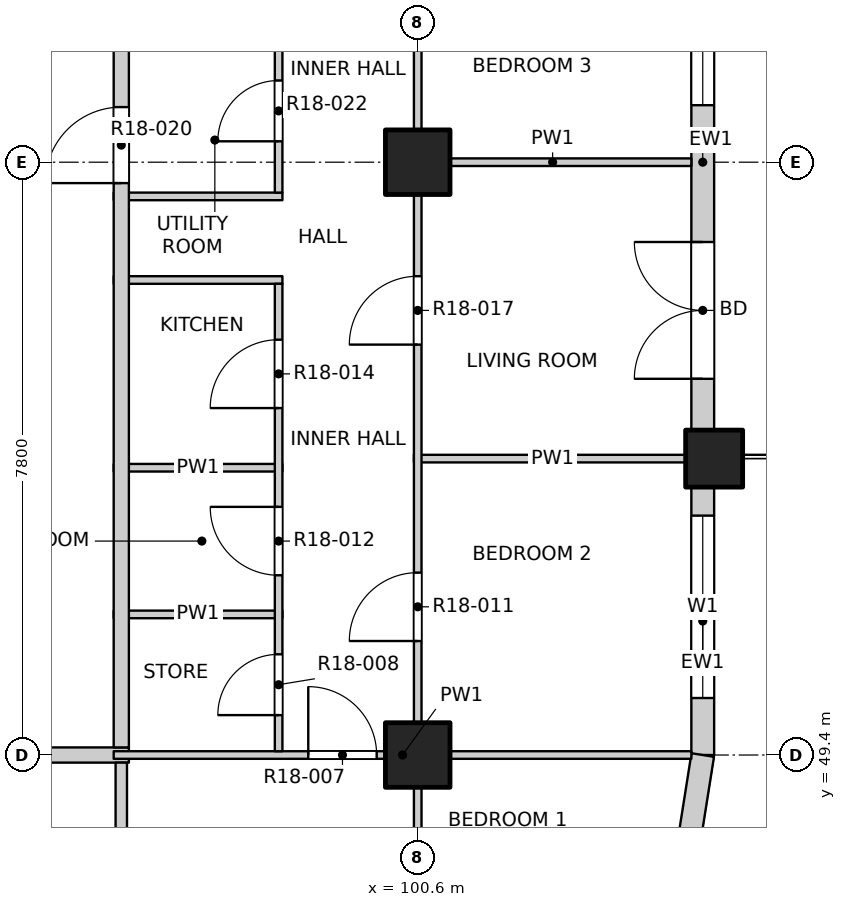
"""IFC4 building model, lengths in metres.
Left out: names, types, materials, properties, quantities, classifications, styles, units other than length and angle.
Written with IfcOpenShell. Run it as: python <this file> out.ifc"""

import sys

from ifc_helpers import new_model, si_unit, direction, frame, frame_2d, origin, origin_2d, place, context, subcontext, project, spatial, rectangle, extrude, element, fill, save


model = new_model("IFC4")
c1 = context("Model", 3, precision=1e-05, world=origin(), true_north=direction((0.0, 1.0)))
c2 = subcontext(c1, "Body", "Model", "MODEL_VIEW")
j1 = project(units=[si_unit("LENGTHUNIT", "METRE"), si_unit("PLANEANGLEUNIT", "RADIAN")], contexts=[c1])
p1 = place(None, origin())
s1 = spatial("IfcSite", under=j1, at=p1, CompositionType="ELEMENT")
p2 = place(p1, origin())
s2 = spatial("IfcBuilding", under=s1, at=p2, CompositionType="ELEMENT")
p3 = place(p2, frame((0.0, 0.0, 189.4)))
s3 = spatial("IfcBuildingStorey", under=s2, at=p3, CompositionType="ELEMENT", Elevation=189.4)
p4 = place(p3, frame((104.5, 53.3, -0.25), z_axis=(0.0, 0.0, 1.0), x_axis=(1.0, 0.0, 0.0)))
e1 = element("IfcColumn", 1, at=p4, inside=s3, PredefinedType="COLUMN", context=c2, shape_type="SweptSolid", body=[
    extrude(rectangle(XDim=0.75, YDim=0.75, at=origin_2d()), origin(), (0.0, 0.0, 1.0), 3.35),
])
for number, where, z_axis, x_axis in (
    (2, (100.6, 49.4, -0.25), (0.0, 0.0, 1.0), (1.0, 0.0, 0.0)),
    (3, (100.6, 57.2, -0.25), (0.0, 0.0, 1.0), (1.0, 0.0, 0.0)),
):
    element("IfcColumn", number, at=place(p3, frame(where, z_axis=z_axis, x_axis=x_axis)), inside=s3, PredefinedType="COLUMN", context=c2, shape_type="SweptSolid", body=[
        extrude(rectangle(XDim=0.85, YDim=0.85, at=origin_2d()), origin(), (0.0, 0.0, 1.0), 3.35),
    ])
p5 = place(p3, frame((104.35, 49.4, 0.0), z_axis=(0.0, 0.0, 1.0), x_axis=(0.0, 1.0, 0.0)))
e4 = element("IfcWall", 4, at=p5, inside=s3, PredefinedType="SOLIDWALL", context=c2, shape_type="SweptSolid", body=[
    extrude(rectangle(XDim=3.525, YDim=0.3, at=frame_2d((1.763, 0.0))), origin(), (0.0, 0.0, 1.0), 3.1),
])
p6 = place(p5, frame((0.75, 0.0, 0.9)))
e5 = element("IfcOpeningElement", 5, at=p6, cuts=e4, PredefinedType="OPENING", context=c2, shape_type="SweptSolid", body=[
    extrude(rectangle(XDim=2.4, YDim=1.8, at=frame_2d((1.2, 0.9))), frame((0.0, 0.16, 0.0), z_axis=(0.0, -1.0, 0.0), x_axis=(1.0, 0.0, 0.0)), (0.0, 0.0, 1.0), 0.32),
])
p7 = place(p3, frame((104.35, 53.675, 0.0), z_axis=(0.0, 0.0, 1.0), x_axis=(0.0, 1.0, 0.0)))
e6 = element("IfcWall", 6, at=p7, inside=s3, PredefinedType="SOLIDWALL", context=c2, shape_type="SweptSolid", body=[
    extrude(rectangle(XDim=7.05, YDim=0.3, at=frame_2d((3.525, 0.0))), origin(), (0.0, 0.0, 1.0), 3.1),
])
p8 = place(p7, frame((0.675, 0.0, 0.0)))
e7 = element("IfcOpeningElement", 7, at=p8, cuts=e6, PredefinedType="OPENING", context=c2, shape_type="SweptSolid", body=[
    extrude(rectangle(XDim=1.8, YDim=2.4, at=frame_2d((0.9, 1.2))), frame((0.0, 0.16, 0.0), z_axis=(0.0, -1.0, 0.0), x_axis=(1.0, 0.0, 0.0)), (0.0, 0.0, 1.0), 0.32),
])
p9 = place(p7, frame((4.275, 0.0, 0.9)))
e8 = element("IfcOpeningElement", 8, at=p9, cuts=e6, PredefinedType="OPENING", context=c2, shape_type="SweptSolid", body=[
    extrude(rectangle(XDim=2.4, YDim=1.8, at=frame_2d((1.2, 0.9))), frame((0.0, 0.16, 0.0), z_axis=(0.0, -1.0, 0.0), x_axis=(1.0, 0.0, 0.0)), (0.0, 0.0, 1.0), 0.32),
])
p10 = place(p3, frame((104.167, 48.241, 0.0), z_axis=(0.0, 0.0, 1.0), x_axis=(0.156496880861, 0.987678452879, 0.0)))
e9 = element("IfcWall", 9, at=p10, inside=s3, PredefinedType="SOLIDWALL", context=c2, shape_type="SweptSolid", body=[
    extrude(rectangle(XDim=1.173, YDim=0.3, at=frame_2d((0.586, 0.0))), origin(), (0.0, 0.0, 1.0), 3.1),
])
p11 = place(p3, frame((73.2, 49.4, 0.0), z_axis=(0.0, 0.0, 1.0), x_axis=(1.0, 0.0, 0.0)))
e10 = element("IfcWall", 10, at=p11, inside=s3, PredefinedType="PARTITIONING", context=c2, shape_type="SweptSolid", body=[
    extrude(rectangle(XDim=23.6, YDim=0.2, at=frame_2d((11.8, 0.0))), origin(), (0.0, 0.0, 1.0), 3.1),
])
p12 = place(p11, frame((4.525, 0.0, 0.0)))
e11 = element("IfcOpeningElement", 11, at=p12, cuts=e10, PredefinedType="OPENING", context=c2, shape_type="SweptSolid", body=[
    extrude(rectangle(XDim=1.2, YDim=2.1, at=frame_2d((0.6, 1.05))), frame((0.0, 0.11, 0.0), z_axis=(0.0, -1.0, 0.0), x_axis=(1.0, 0.0, 0.0)), (0.0, 0.0, 1.0), 0.22),
])
p13 = place(p11, frame((12.325, 0.0, 0.0)))
e12 = element("IfcOpeningElement", 12, at=p13, cuts=e10, PredefinedType="OPENING", context=c2, shape_type="SweptSolid", body=[
    extrude(rectangle(XDim=1.2, YDim=2.1, at=frame_2d((0.6, 1.05))), frame((0.0, 0.11, 0.0), z_axis=(0.0, -1.0, 0.0), x_axis=(1.0, 0.0, 0.0)), (0.0, 0.0, 1.0), 0.22),
])
p14 = place(p11, frame((20.125, 0.0, 0.0)))
e13 = element("IfcOpeningElement", 13, at=p14, cuts=e10, PredefinedType="OPENING", context=c2, shape_type="SweptSolid", body=[
    extrude(rectangle(XDim=1.2, YDim=2.1, at=frame_2d((0.6, 1.05))), frame((0.0, 0.11, 0.0), z_axis=(0.0, -1.0, 0.0), x_axis=(1.0, 0.0, 0.0)), (0.0, 0.0, 1.0), 0.22),
])
p15 = place(p3, frame((96.6, 49.4, 0.0), z_axis=(0.0, 0.0, 1.0), x_axis=(1.0, 0.0, 0.0)))
e14 = element("IfcWall", 14, at=p15, inside=s3, PredefinedType="PARTITIONING", context=c2, shape_type="SweptSolid", body=[
    extrude(rectangle(XDim=7.6, YDim=0.1, at=frame_2d((3.8, 0.0))), origin(), (0.0, 0.0, 1.0), 3.1),
])
p16 = place(p15, frame((2.56, 0.0, 0.0)))
e15 = element("IfcOpeningElement", 15, at=p16, cuts=e14, PredefinedType="OPENING", context=c2, shape_type="SweptSolid", body=[
    extrude(rectangle(XDim=0.9, YDim=2.1, at=frame_2d((0.45, 1.05))), frame((0.0, 0.06, 0.0), z_axis=(0.0, -1.0, 0.0), x_axis=(1.0, 0.0, 0.0)), (0.0, 0.0, 1.0), 0.12),
])
for number, where, z_axis, x_axis in (
    (16, (96.6, 51.25, 0.0), (0.0, 0.0, 1.0), (1.0, 0.0, 0.0)),
    (17, (96.6, 53.18, 0.0), (0.0, 0.0, 1.0), (1.0, 0.0, 0.0)),
):
    element("IfcWall", number, at=place(p3, frame(where, z_axis=z_axis, x_axis=x_axis)), inside=s3, PredefinedType="PARTITIONING", context=c2, shape_type="SweptSolid", body=[
        extrude(rectangle(XDim=2.22, YDim=0.1, at=frame_2d((1.11, 0.0))), origin(), (0.0, 0.0, 1.0), 3.1),
    ])
p17 = place(p3, frame((100.55, 53.3, 0.0), z_axis=(0.0, 0.0, 1.0), x_axis=(1.0, 0.0, 0.0)))
e18 = element("IfcWall", 18, at=p17, inside=s3, PredefinedType="PARTITIONING", context=c2, shape_type="SweptSolid", body=[
    extrude(rectangle(XDim=3.65, YDim=0.1, at=frame_2d((1.825, 0.0))), origin(), (0.0, 0.0, 1.0), 3.1),
])
for number, where, z_axis, x_axis in (
    (19, (96.6, 55.65, 0.0), (0.0, 0.0, 1.0), (1.0, 0.0, 0.0)),
    (20, (96.6, 56.75, 0.0), (0.0, 0.0, 1.0), (1.0, 0.0, 0.0)),
):
    element("IfcWall", number, at=place(p3, frame(where, z_axis=z_axis, x_axis=x_axis)), inside=s3, PredefinedType="PARTITIONING", context=c2, shape_type="SweptSolid", body=[
        extrude(rectangle(XDim=2.22, YDim=0.1, at=frame_2d((1.11, 0.0))), origin(), (0.0, 0.0, 1.0), 3.1),
    ])
p18 = place(p3, frame((100.55, 57.2, 0.0), z_axis=(0.0, 0.0, 1.0), x_axis=(1.0, 0.0, 0.0)))
e21 = element("IfcWall", 21, at=p18, inside=s3, PredefinedType="PARTITIONING", context=c2, shape_type="SweptSolid", body=[
    extrude(rectangle(XDim=3.65, YDim=0.1, at=frame_2d((1.825, 0.0))), origin(), (0.0, 0.0, 1.0), 3.1),
])
p19 = place(p3, frame((96.7, 45.8, 0.0), z_axis=(0.0, 0.0, 1.0), x_axis=(0.0, 1.0, 0.0)))
e22 = element("IfcWall", 22, at=p19, inside=s3, PredefinedType="PARTITIONING", context=c2, shape_type="SweptSolid", body=[
    extrude(rectangle(XDim=3.5, YDim=0.15, at=frame_2d((1.75, 0.0))), origin(), (0.0, 0.0, 1.0), 3.1),
])
p20 = place(p3, frame((96.7, 49.5, 0.0), z_axis=(0.0, 0.0, 1.0), x_axis=(0.0, 1.0, 0.0)))
e23 = element("IfcWall", 23, at=p20, inside=s3, PredefinedType="PARTITIONING", context=c2, shape_type="SweptSolid", body=[
    extrude(rectangle(XDim=34.7, YDim=0.2, at=frame_2d((17.35, 0.0))), origin(), (0.0, 0.0, 1.0), 3.1),
])
p21 = place(p20, frame((7.425, 0.0, 0.0)))
e24 = element("IfcOpeningElement", 24, at=p21, cuts=e23, PredefinedType="OPENING", context=c2, shape_type="SweptSolid", body=[
    extrude(rectangle(XDim=1.0, YDim=2.1, at=frame_2d((0.5, 1.05))), frame((0.0, 0.11, 0.0), z_axis=(0.0, -1.0, 0.0), x_axis=(1.0, 0.0, 0.0)), (0.0, 0.0, 1.0), 0.22),
])
p22 = place(p20, frame((18.475, 0.0, 0.0)))
e25 = element("IfcOpeningElement", 25, at=p22, cuts=e23, PredefinedType="OPENING", context=c2, shape_type="SweptSolid", body=[
    extrude(rectangle(XDim=1.0, YDim=2.1, at=frame_2d((0.5, 1.05))), frame((0.0, 0.11, 0.0), z_axis=(0.0, -1.0, 0.0), x_axis=(1.0, 0.0, 0.0)), (0.0, 0.0, 1.0), 0.22),
])
p23 = place(p20, frame((29.025, 0.0, 0.0)))
e26 = element("IfcOpeningElement", 26, at=p23, cuts=e23, PredefinedType="OPENING", context=c2, shape_type="SweptSolid", body=[
    extrude(rectangle(XDim=1.0, YDim=2.1, at=frame_2d((0.5, 1.05))), frame((0.0, 0.11, 0.0), z_axis=(0.0, -1.0, 0.0), x_axis=(1.0, 0.0, 0.0)), (0.0, 0.0, 1.0), 0.22),
])
p24 = place(p3, frame((98.77, 49.45, 0.0), z_axis=(0.0, 0.0, 1.0), x_axis=(0.0, 1.0, 0.0)))
e27 = element("IfcWall", 27, at=p24, inside=s3, PredefinedType="PARTITIONING", context=c2, shape_type="SweptSolid", body=[
    extrude(rectangle(XDim=6.15, YDim=0.1, at=frame_2d((3.075, 0.0))), origin(), (0.0, 0.0, 1.0), 3.1),
])
p25 = place(p24, frame((0.475, 0.0, 0.0)))
e28 = element("IfcOpeningElement", 28, at=p25, cuts=e27, PredefinedType="OPENING", context=c2, shape_type="SweptSolid", body=[
    extrude(rectangle(XDim=0.8, YDim=2.1, at=frame_2d((0.4, 1.05))), frame((0.0, 0.06, 0.0), z_axis=(0.0, -1.0, 0.0), x_axis=(1.0, 0.0, 0.0)), (0.0, 0.0, 1.0), 0.12),
])
p26 = place(p24, frame((2.315, 0.0, 0.0)))
e29 = element("IfcOpeningElement", 29, at=p26, cuts=e27, PredefinedType="OPENING", context=c2, shape_type="SweptSolid", body=[
    extrude(rectangle(XDim=0.9, YDim=2.1, at=frame_2d((0.45, 1.05))), frame((0.0, 0.06, 0.0), z_axis=(0.0, -1.0, 0.0), x_axis=(1.0, 0.0, 0.0)), (0.0, 0.0, 1.0), 0.12),
])
p27 = place(p24, frame((4.515, 0.0, 0.0)))
e30 = element("IfcOpeningElement", 30, at=p27, cuts=e27, PredefinedType="OPENING", context=c2, shape_type="SweptSolid", body=[
    extrude(rectangle(XDim=0.9, YDim=2.1, at=frame_2d((0.45, 1.05))), frame((0.0, 0.06, 0.0), z_axis=(0.0, -1.0, 0.0), x_axis=(1.0, 0.0, 0.0)), (0.0, 0.0, 1.0), 0.12),
])
p28 = place(p3, frame((98.77, 56.8, 0.0), z_axis=(0.0, 0.0, 1.0), x_axis=(0.0, 1.0, 0.0)))
e31 = element("IfcWall", 31, at=p28, inside=s3, PredefinedType="PARTITIONING", context=c2, shape_type="SweptSolid", body=[
    extrude(rectangle(XDim=9.85, YDim=0.1, at=frame_2d((4.925, 0.0))), origin(), (0.0, 0.0, 1.0), 3.1),
])
p29 = place(p28, frame((0.675, 0.0, 0.0)))
e32 = element("IfcOpeningElement", 32, at=p29, cuts=e31, PredefinedType="OPENING", context=c2, shape_type="SweptSolid", body=[
    extrude(rectangle(XDim=0.8, YDim=2.1, at=frame_2d((0.4, 1.05))), frame((0.0, 0.06, 0.0), z_axis=(0.0, -1.0, 0.0), x_axis=(1.0, 0.0, 0.0)), (0.0, 0.0, 1.0), 0.12),
])
p30 = place(p28, frame((2.8, 0.0, 0.0)))
e33 = element("IfcOpeningElement", 33, at=p30, cuts=e31, PredefinedType="OPENING", context=c2, shape_type="SweptSolid", body=[
    extrude(rectangle(XDim=0.9, YDim=2.1, at=frame_2d((0.45, 1.05))), frame((0.0, 0.06, 0.0), z_axis=(0.0, -1.0, 0.0), x_axis=(1.0, 0.0, 0.0)), (0.0, 0.0, 1.0), 0.12),
])
p31 = place(p28, frame((5.325, 0.0, 0.0)))
e34 = element("IfcOpeningElement", 34, at=p31, cuts=e31, PredefinedType="OPENING", context=c2, shape_type="SweptSolid", body=[
    extrude(rectangle(XDim=0.8, YDim=2.1, at=frame_2d((0.4, 1.05))), frame((0.0, 0.06, 0.0), z_axis=(0.0, -1.0, 0.0), x_axis=(1.0, 0.0, 0.0)), (0.0, 0.0, 1.0), 0.12),
])
p32 = place(p28, frame((8.125, 0.0, 0.0)))
e35 = element("IfcOpeningElement", 35, at=p32, cuts=e31, PredefinedType="OPENING", context=c2, shape_type="SweptSolid", body=[
    extrude(rectangle(XDim=0.8, YDim=2.1, at=frame_2d((0.4, 1.05))), frame((0.0, 0.06, 0.0), z_axis=(0.0, -1.0, 0.0), x_axis=(1.0, 0.0, 0.0)), (0.0, 0.0, 1.0), 0.12),
])
p33 = place(p3, frame((100.6, 45.8, 0.0), z_axis=(0.0, 0.0, 1.0), x_axis=(0.0, 1.0, 0.0)))
e36 = element("IfcWall", 36, at=p33, inside=s3, PredefinedType="PARTITIONING", context=c2, shape_type="SweptSolid", body=[
    extrude(rectangle(XDim=38.4, YDim=0.1, at=frame_2d((19.2, 0.0))), origin(), (0.0, 0.0, 1.0), 3.1),
])
p34 = place(p33, frame((1.05, 0.0, 0.0)))
e37 = element("IfcOpeningElement", 37, at=p34, cuts=e36, PredefinedType="OPENING", context=c2, shape_type="SweptSolid", body=[
    extrude(rectangle(XDim=1.2, YDim=2.1, at=frame_2d((0.6, 1.05))), frame((0.0, 0.06, 0.0), z_axis=(0.0, -1.0, 0.0), x_axis=(1.0, 0.0, 0.0)), (0.0, 0.0, 1.0), 0.12),
])
p35 = place(p33, frame((5.1, 0.0, 0.0)))
e38 = element("IfcOpeningElement", 38, at=p35, cuts=e36, PredefinedType="OPENING", context=c2, shape_type="SweptSolid", body=[
    extrude(rectangle(XDim=0.9, YDim=2.1, at=frame_2d((0.45, 1.05))), frame((0.0, 0.06, 0.0), z_axis=(0.0, -1.0, 0.0), x_axis=(1.0, 0.0, 0.0)), (0.0, 0.0, 1.0), 0.12),
])
p36 = place(p33, frame((9.0, 0.0, 0.0)))
e39 = element("IfcOpeningElement", 39, at=p36, cuts=e36, PredefinedType="OPENING", context=c2, shape_type="SweptSolid", body=[
    extrude(rectangle(XDim=0.9, YDim=2.1, at=frame_2d((0.45, 1.05))), frame((0.0, 0.06, 0.0), z_axis=(0.0, -1.0, 0.0), x_axis=(1.0, 0.0, 0.0)), (0.0, 0.0, 1.0), 0.12),
])
p37 = place(p33, frame((12.9, 0.0, 0.0)))
e40 = element("IfcOpeningElement", 40, at=p37, cuts=e36, PredefinedType="OPENING", context=c2, shape_type="SweptSolid", body=[
    extrude(rectangle(XDim=0.9, YDim=2.1, at=frame_2d((0.45, 1.05))), frame((0.0, 0.06, 0.0), z_axis=(0.0, -1.0, 0.0), x_axis=(1.0, 0.0, 0.0)), (0.0, 0.0, 1.0), 0.12),
])
p38 = place(p33, frame((19.725, 0.0, 0.0)))
e41 = element("IfcOpeningElement", 41, at=p38, cuts=e36, PredefinedType="OPENING", context=c2, shape_type="SweptSolid", body=[
    extrude(rectangle(XDim=1.2, YDim=2.1, at=frame_2d((0.6, 1.05))), frame((0.0, 0.06, 0.0), z_axis=(0.0, -1.0, 0.0), x_axis=(1.0, 0.0, 0.0)), (0.0, 0.0, 1.0), 0.12),
])
p39 = place(p33, frame((24.6, 0.0, 0.0)))
e42 = element("IfcOpeningElement", 42, at=p39, cuts=e36, PredefinedType="OPENING", context=c2, shape_type="SweptSolid", body=[
    extrude(rectangle(XDim=0.9, YDim=2.1, at=frame_2d((0.45, 1.05))), frame((0.0, 0.06, 0.0), z_axis=(0.0, -1.0, 0.0), x_axis=(1.0, 0.0, 0.0)), (0.0, 0.0, 1.0), 0.12),
])
p40 = place(p33, frame((28.5, 0.0, 0.0)))
e43 = element("IfcOpeningElement", 43, at=p40, cuts=e36, PredefinedType="OPENING", context=c2, shape_type="SweptSolid", body=[
    extrude(rectangle(XDim=0.9, YDim=2.1, at=frame_2d((0.45, 1.05))), frame((0.0, 0.06, 0.0), z_axis=(0.0, -1.0, 0.0), x_axis=(1.0, 0.0, 0.0)), (0.0, 0.0, 1.0), 0.12),
])
p41 = place(p33, frame((32.4, 0.0, 0.0)))
e44 = element("IfcOpeningElement", 44, at=p41, cuts=e36, PredefinedType="OPENING", context=c2, shape_type="SweptSolid", body=[
    extrude(rectangle(XDim=0.9, YDim=2.1, at=frame_2d((0.45, 1.05))), frame((0.0, 0.06, 0.0), z_axis=(0.0, -1.0, 0.0), x_axis=(1.0, 0.0, 0.0)), (0.0, 0.0, 1.0), 0.12),
])
p42 = place(p33, frame((36.15, 0.0, 0.0)))
e45 = element("IfcOpeningElement", 45, at=p42, cuts=e36, PredefinedType="OPENING", context=c2, shape_type="SweptSolid", body=[
    extrude(rectangle(XDim=1.2, YDim=2.1, at=frame_2d((0.6, 1.05))), frame((0.0, 0.06, 0.0), z_axis=(0.0, -1.0, 0.0), x_axis=(1.0, 0.0, 0.0)), (0.0, 0.0, 1.0), 0.12),
])
p43 = place(p6, origin())
e46 = element("IfcWindow", 46, at=p43, inside=s3, PartitioningType="DOUBLE_PANEL_VERTICAL", PredefinedType="WINDOW", context=c2, shape_type="SweptSolid", body=[
    extrude(rectangle(XDim=2.4, YDim=1.8, at=frame_2d((1.2, 0.9))), frame((0.0, 0.03, 0.0), z_axis=(0.0, -1.0, 0.0), x_axis=(1.0, 0.0, 0.0)), (0.0, 0.0, 1.0), 0.06),
])
fill(e5, e46)
p44 = place(p8, origin())
e47 = element("IfcDoor", 47, at=p44, inside=s3, OperationType="DOUBLE_DOOR_SINGLE_SWING", PredefinedType="DOOR", context=c2, shape_type="SweptSolid", body=[
    extrude(rectangle(XDim=1.8, YDim=2.4, at=frame_2d((0.9, 1.2))), frame((0.0, 0.025, 0.0), z_axis=(0.0, -1.0, 0.0), x_axis=(1.0, 0.0, 0.0)), (0.0, 0.0, 1.0), 0.05),
])
fill(e7, e47)
p45 = place(p9, origin())
e48 = element("IfcWindow", 48, at=p45, inside=s3, PartitioningType="DOUBLE_PANEL_VERTICAL", PredefinedType="WINDOW", context=c2, shape_type="SweptSolid", body=[
    extrude(rectangle(XDim=2.4, YDim=1.8, at=frame_2d((1.2, 0.9))), frame((0.0, 0.03, 0.0), z_axis=(0.0, -1.0, 0.0), x_axis=(1.0, 0.0, 0.0)), (0.0, 0.0, 1.0), 0.06),
])
fill(e8, e48)
p46 = place(p16, origin())
e49 = element("IfcDoor", 49, at=p46, inside=s3, OperationType="SINGLE_SWING_LEFT", PredefinedType="DOOR", context=c2, shape_type="SweptSolid", body=[
    extrude(rectangle(XDim=0.9, YDim=2.1, at=frame_2d((0.45, 1.05))), frame((0.0, 0.025, 0.0), z_axis=(0.0, -1.0, 0.0), x_axis=(1.0, 0.0, 0.0)), (0.0, 0.0, 1.0), 0.05),
])
fill(e15, e49)
p47 = place(p25, origin())
e50 = element("IfcDoor", 50, at=p47, inside=s3, OperationType="SINGLE_SWING_LEFT", PredefinedType="DOOR", context=c2, shape_type="SweptSolid", body=[
    extrude(rectangle(XDim=0.8, YDim=2.1, at=frame_2d((0.4, 1.05))), frame((0.0, 0.025, 0.0), z_axis=(0.0, -1.0, 0.0), x_axis=(1.0, 0.0, 0.0)), (0.0, 0.0, 1.0), 0.05),
])
fill(e28, e50)
p48 = place(p35, origin())
e51 = element("IfcDoor", 51, at=p48, inside=s3, OperationType="SINGLE_SWING_LEFT", PredefinedType="DOOR", context=c2, shape_type="SweptSolid", body=[
    extrude(rectangle(XDim=0.9, YDim=2.1, at=frame_2d((0.45, 1.05))), frame((0.0, 0.025, 0.0), z_axis=(0.0, -1.0, 0.0), x_axis=(1.0, 0.0, 0.0)), (0.0, 0.0, 1.0), 0.05),
])
fill(e38, e51)
p49 = place(p26, origin())
e52 = element("IfcDoor", 52, at=p49, inside=s3, OperationType="SINGLE_SWING_RIGHT", PredefinedType="DOOR", context=c2, shape_type="SweptSolid", body=[
    extrude(rectangle(XDim=0.9, YDim=2.1, at=frame_2d((0.45, 1.05))), frame((0.0, 0.025, 0.0), z_axis=(0.0, -1.0, 0.0), x_axis=(1.0, 0.0, 0.0)), (0.0, 0.0, 1.0), 0.05),
])
fill(e29, e52)
p50 = place(p27, origin())
e53 = element("IfcDoor", 53, at=p50, inside=s3, OperationType="SINGLE_SWING_LEFT", PredefinedType="DOOR", context=c2, shape_type="SweptSolid", body=[
    extrude(rectangle(XDim=0.9, YDim=2.1, at=frame_2d((0.45, 1.05))), frame((0.0, 0.025, 0.0), z_axis=(0.0, -1.0, 0.0), x_axis=(1.0, 0.0, 0.0)), (0.0, 0.0, 1.0), 0.05),
])
fill(e30, e53)
p51 = place(p36, origin())
e54 = element("IfcDoor", 54, at=p51, inside=s3, OperationType="SINGLE_SWING_LEFT", PredefinedType="DOOR", context=c2, shape_type="SweptSolid", body=[
    extrude(rectangle(XDim=0.9, YDim=2.1, at=frame_2d((0.45, 1.05))), frame((0.0, 0.025, 0.0), z_axis=(0.0, -1.0, 0.0), x_axis=(1.0, 0.0, 0.0)), (0.0, 0.0, 1.0), 0.05),
])
fill(e39, e54)
p52 = place(p21, origin())
e55 = element("IfcDoor", 55, at=p52, inside=s3, OperationType="SINGLE_SWING_LEFT", PredefinedType="DOOR", context=c2, shape_type="SweptSolid", body=[
    extrude(rectangle(XDim=1.0, YDim=2.1, at=frame_2d((0.5, 1.05))), frame((0.0, 0.025, 0.0), z_axis=(0.0, -1.0, 0.0), x_axis=(1.0, 0.0, 0.0)), (0.0, 0.0, 1.0), 0.05),
])
fill(e24, e55)
p53 = place(p29, origin())
e56 = element("IfcDoor", 56, at=p53, inside=s3, OperationType="SINGLE_SWING_LEFT", PredefinedType="DOOR", context=c2, shape_type="SweptSolid", body=[
    extrude(rectangle(XDim=0.8, YDim=2.1, at=frame_2d((0.4, 1.05))), frame((0.0, 0.025, 0.0), z_axis=(0.0, -1.0, 0.0), x_axis=(1.0, 0.0, 0.0)), (0.0, 0.0, 1.0), 0.05),
])
fill(e32, e56)
save(model, sys.argv[1])
